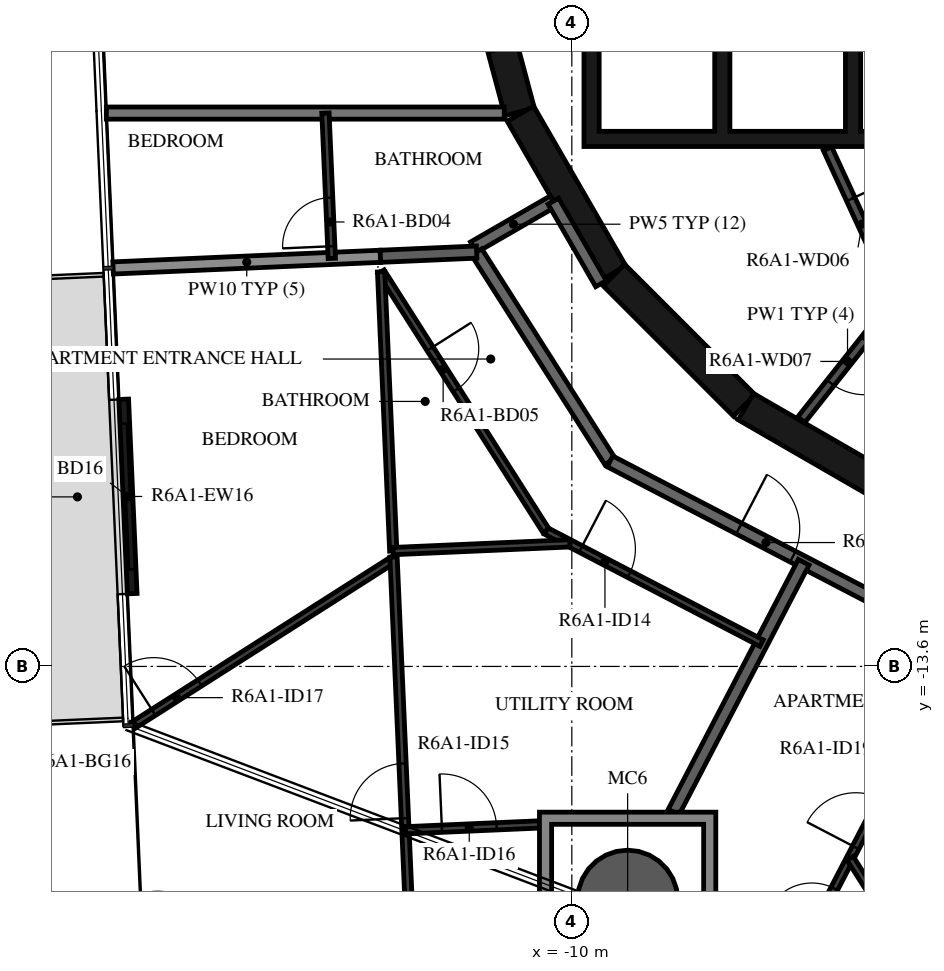
"""IFC4 building model, lengths in metres.
Left out: names, types, materials, properties, quantities, classifications, styles, units other than length and angle.
Written with IfcOpenShell. Run it as: python <this file> out.ifc"""

import sys

from ifc_helpers import new_model, si_unit, direction, frame, frame_2d, origin, origin_2d, place, context, subcontext, project, spatial, polyline, rectangle, hollow_circle, outline, extrude, element, fill, save


model = new_model("IFC4")
c1 = context("Model", 3, precision=1e-05, world=origin(), true_north=direction((0.0, 1.0)))
c2 = subcontext(c1, "Body", "Model", "MODEL_VIEW")
j1 = project(units=[si_unit("LENGTHUNIT", "METRE"), si_unit("PLANEANGLEUNIT", "RADIAN")], contexts=[c1])
p1 = place(None, origin())
s1 = spatial("IfcSite", under=j1, at=p1, CompositionType="ELEMENT")
p2 = place(p1, origin())
s2 = spatial("IfcBuilding", under=s1, at=p2, CompositionType="ELEMENT")
p3 = place(p2, frame((0.0, 0.0, 230.2)))
s3 = spatial("IfcBuildingStorey", under=s2, at=p3, CompositionType="ELEMENT", Elevation=230.2)
p4 = place(p3, frame((-9.082, -17.446, -0.38), z_axis=(0.0, 0.0, 1.0), x_axis=(1.0, 0.0, 0.0)))
e1 = element("IfcColumn", 1, at=p4, inside=s3, PredefinedType="COLUMN", context=c2, shape_type="SweptSolid", body=[
    extrude(hollow_circle(Radius=0.825, WallThickness=0.04, at=origin_2d()), origin(), (0.0, 0.0, 1.0), 3.5),
])
p5 = place(p3, frame((-17.369, -9.207, 0.0), z_axis=(0.0, 0.0, 1.0), x_axis=(0.043639181999, -0.999047357133, 0.0)))
e2 = element("IfcWall", 2, at=p5, inside=s3, PredefinedType="STANDARD", context=c2, shape_type="SweptSolid", body=[
    extrude(rectangle(XDim=3.2, YDim=0.16, at=frame_2d((1.6, 0.0))), origin(), (0.0, 0.0, 1.0), 3.12),
])
p6 = place(p5, frame((0.4, 0.0, 0.0)))
e3 = element("IfcOpeningElement", 3, at=p6, cuts=e2, PredefinedType="OPENING", context=c2, shape_type="SweptSolid", body=[
    extrude(rectangle(XDim=2.4, YDim=2.4, at=frame_2d((1.2, 1.2))), frame((0.0, 0.09, 0.0), z_axis=(0.0, -1.0, 0.0), x_axis=(1.0, 0.0, 0.0)), (0.0, 0.0, 1.0), 0.18),
])
p7 = place(p3, frame((-11.643, -1.55, 0.0), z_axis=(0.0, 0.0, 1.0), x_axis=(0.258734743916, -0.965948410781, 0.0)))
e4 = element("IfcWall", 4, at=p7, inside=s3, PredefinedType="SHEAR", context=c2, shape_type="SweptSolid", body=[
    extrude(rectangle(XDim=3.033, YDim=0.5, at=frame_2d((1.516, 0.0))), origin(), (0.0, 0.0, 1.0), 3.12),
])
p8 = place(p7, frame((1.066, 0.0, 0.0)))
e5 = element("IfcOpeningElement", 5, at=p8, cuts=e4, PredefinedType="OPENING", context=c2, shape_type="SweptSolid", body=[
    extrude(rectangle(XDim=0.9, YDim=2.1, at=frame_2d((0.45, 1.05))), frame((0.0, 0.26, 0.0), z_axis=(0.0, -1.0, 0.0), x_axis=(1.0, 0.0, 0.0)), (0.0, 0.0, 1.0), 0.52),
])
p9 = place(p3, frame((-10.845, -4.51, 0.0), z_axis=(0.0, 0.0, 1.0), x_axis=(0.500087131594, -0.865975092491, 0.0)))
e6 = element("IfcWall", 6, at=p9, inside=s3, PredefinedType="SHEAR", context=c2, shape_type="SweptSolid", body=[
    extrude(rectangle(XDim=3.033, YDim=0.5, at=frame_2d((1.516, 0.0))), origin(), (0.0, 0.0, 1.0), 3.12),
])
p10 = place(p3, frame((-9.308, -7.164, 0.0), z_axis=(0.0, 0.0, 1.0), x_axis=(0.707106781187, -0.707106781187, 0.0)))
e7 = element("IfcWall", 7, at=p10, inside=s3, PredefinedType="SHEAR", context=c2, shape_type="SweptSolid", body=[
    extrude(rectangle(XDim=3.032, YDim=0.5, at=frame_2d((1.516, 0.0))), origin(), (0.0, 0.0, 1.0), 3.12),
])
p11 = place(p3, frame((-7.137, -9.329, 0.0), z_axis=(0.0, 0.0, 1.0), x_axis=(0.865975092491, -0.500087131594, 0.0)))
e8 = element("IfcWall", 8, at=p11, inside=s3, PredefinedType="SHEAR", context=c2, shape_type="SweptSolid", body=[
    extrude(rectangle(XDim=3.033, YDim=0.5, at=frame_2d((1.516, 0.0))), origin(), (0.0, 0.0, 1.0), 3.12),
])
p12 = place(p3, origin())
e9 = element("IfcWall", 9, at=p12, inside=s3, PredefinedType="SHEAR", context=c2, shape_type="SweptSolid", body=[
    extrude(outline(polyline([(9.8, -5.05), (9.8, -4.8), (9.8, -1.9), (9.55, -1.9), (9.55, -4.8), (7.65, -4.8), (7.65, -1.9), (7.4, -1.9), (7.4, -4.8), (5.5, -4.8), (5.5, -1.9), (5.25, -1.9), (5.25, -4.8), (3.35, -4.8), (3.35, -1.9), (3.1, -1.9), (3.1, -4.8), (1.2, -4.8), (1.2, -1.9), (0.95, -1.9), (0.95, -4.8), (-0.95, -4.8), (-0.95, -1.9), (-1.2, -1.9), (-1.2, -4.8), (-5.25, -4.8), (-5.25, -1.9), (-5.5, -1.9), (-5.5, -4.8), (-7.4, -4.8), (-7.4, -1.9), (-7.65, -1.9), (-7.65, -4.8), (-9.55, -4.8), (-9.55, -1.9), (-9.8, -1.9), (-9.8, -4.8), (-9.8, -5.05), (9.8, -5.05)])), origin(), (0.0, 0.0, 1.0), 3.12),
])
p13 = place(p3, frame((-5.795, -5.086, 0.0), z_axis=(0.0, 0.0, 1.0), x_axis=(0.417887867606, -0.908498613157, 0.0)))
e10 = element("IfcWall", 10, at=p13, inside=s3, PredefinedType="PARTITIONING", context=c2, shape_type="SweptSolid", body=[
    extrude(rectangle(XDim=2.726, YDim=0.15, at=frame_2d((1.363, 0.0))), origin(), (0.0, 0.0, 1.0), 3.12),
])
p14 = place(p13, frame((0.913, 0.0, 0.0)))
e11 = element("IfcOpeningElement", 11, at=p14, cuts=e10, PredefinedType="OPENING", context=c2, shape_type="SweptSolid", body=[
    extrude(rectangle(XDim=0.9, YDim=2.1, at=frame_2d((0.45, 1.05))), frame((0.0, 0.085, 0.0), z_axis=(0.0, -1.0, 0.0), x_axis=(1.0, 0.0, 0.0)), (0.0, 0.0, 1.0), 0.17),
])
p15 = place(p3, frame((-4.706, -7.625, 0.0), z_axis=(0.0, 0.0, 1.0), x_axis=(-0.621392599334, -0.783499353856, 0.0)))
e12 = element("IfcWall", 12, at=p15, inside=s3, PredefinedType="PARTITIONING", context=c2, shape_type="SweptSolid", body=[
    extrude(rectangle(XDim=2.447, YDim=0.15, at=frame_2d((1.224, 0.0))), origin(), (0.0, 0.0, 1.0), 3.12),
])
p16 = place(p15, frame((0.774, 0.0, 0.0)))
e13 = element("IfcOpeningElement", 13, at=p16, cuts=e12, PredefinedType="OPENING", context=c2, shape_type="SweptSolid", body=[
    extrude(rectangle(XDim=0.9, YDim=2.1, at=frame_2d((0.45, 1.05))), frame((0.0, 0.085, 0.0), z_axis=(0.0, -1.0, 0.0), x_axis=(1.0, 0.0, 0.0)), (0.0, 0.0, 1.0), 0.17),
])
p17 = place(p3, frame((-10.303, -5.949, 0.0), z_axis=(0.0, 0.0, 1.0), x_axis=(-0.866043382451, -0.499968858743, 0.0)))
e14 = element("IfcWall", 14, at=p17, inside=s3, PredefinedType="STANDARD", context=c2, shape_type="SweptSolid", body=[
    extrude(rectangle(XDim=1.515, YDim=0.2, at=frame_2d((0.758, 0.0))), origin(), (0.0, 0.0, 1.0), 3.12),
])
p18 = place(p3, frame((-9.52, -7.305, 0.0), z_axis=(0.0, 0.0, 1.0), x_axis=(-0.500028278809, 0.866009076391, 0.0)))
e15 = element("IfcWall", 15, at=p18, inside=s3, PredefinedType="STANDARD", context=c2, shape_type="SweptSolid", body=[
    extrude(rectangle(XDim=1.566, YDim=0.2, at=frame_2d((0.783, 0.0))), origin(), (0.0, 0.0, 1.0), 3.12),
])
p19 = place(p3, frame((-11.565, -6.786, 0.0), z_axis=(0.0, 0.0, 1.0), x_axis=(0.537297327359, -0.843392898958, 0.0)))
e16 = element("IfcWall", 16, at=p19, inside=s3, PredefinedType="STANDARD", context=c2, shape_type="SweptSolid", body=[
    extrude(rectangle(XDim=4.081, YDim=0.2, at=frame_2d((2.041, 0.0))), origin(), (0.0, 0.0, 1.0), 3.12),
])
p20 = place(p3, frame((-9.372, -10.228, 0.0), z_axis=(0.0, 0.0, 1.0), x_axis=(0.887005184532, -0.461759464021, 0.0)))
e17 = element("IfcWall", 17, at=p20, inside=s3, PredefinedType="STANDARD", context=c2, shape_type="SweptSolid", body=[
    extrude(rectangle(XDim=7.181, YDim=0.2, at=frame_2d((3.591, 0.0))), origin(), (0.0, 0.0, 1.0), 3.12),
])
p21 = place(p20, frame((2.391, 0.0, 0.0)))
e18 = element("IfcOpeningElement", 18, at=p21, cuts=e17, PredefinedType="OPENING", context=c2, shape_type="SweptSolid", body=[
    extrude(rectangle(XDim=1.0, YDim=2.1, at=frame_2d((0.5, 1.05))), frame((0.0, 0.11, 0.0), z_axis=(0.0, -1.0, 0.0), x_axis=(1.0, 0.0, 0.0)), (0.0, 0.0, 1.0), 0.22),
])
p22 = place(p3, frame((-17.655, -4.5, 0.0), z_axis=(0.0, 0.0, 1.0), x_axis=(1.0, 0.0, 0.0)))
e19 = element("IfcWall", 19, at=p22, inside=s3, PredefinedType="STANDARD", context=c2, shape_type="SweptSolid", body=[
    extrude(rectangle(XDim=6.543, YDim=0.2, at=frame_2d((3.272, 0.0))), origin(), (0.0, 0.0, 1.0), 3.12),
])
p23 = place(p3, frame((-17.544, -7.047, 0.0), z_axis=(0.0, 0.0, 1.0), x_axis=(0.99904608111, 0.043668384662, 0.0)))
e20 = element("IfcWall", 20, at=p23, inside=s3, PredefinedType="STANDARD", context=c2, shape_type="SweptSolid", body=[
    extrude(rectangle(XDim=4.4, YDim=0.2, at=frame_2d((2.2, 0.0))), origin(), (0.0, 0.0, 1.0), 2.73),
])
p24 = place(p3, frame((-13.148, -6.855, 0.0), z_axis=(0.0, 0.0, 1.0), x_axis=(0.999048583464, 0.043611098121, 0.0)))
e21 = element("IfcWall", 21, at=p24, inside=s3, PredefinedType="STANDARD", context=c2, shape_type="SweptSolid", body=[
    extrude(rectangle(XDim=1.584, YDim=0.2, at=frame_2d((0.792, 0.0))), origin(), (0.0, 0.0, 1.0), 3.12),
])
p25 = place(p3, frame((-8.326, -15.996, 0.0), z_axis=(0.0, 0.0, 1.0), x_axis=(0.461739255077, 0.887015704664, 0.0)))
e22 = element("IfcWall", 22, at=p25, inside=s3, PredefinedType="STANDARD", context=c2, shape_type="SweptSolid", body=[
    extrude(rectangle(XDim=4.633, YDim=0.2, at=frame_2d((2.317, 0.0))), origin(), (0.0, 0.0, 1.0), 3.12),
])
p26 = place(p3, frame((-13.947, -6.89, 0.0), z_axis=(0.0, 0.0, 1.0), x_axis=(-0.043680814195, 0.999045537737, 0.0)))
e23 = element("IfcWall", 23, at=p26, inside=s3, PredefinedType="PARTITIONING", context=c2, shape_type="SweptSolid", body=[
    extrude(rectangle(XDim=2.392, YDim=0.12, at=frame_2d((1.196, 0.0))), origin(), (0.0, 0.0, 1.0), 3.12),
])
p27 = place(p26, frame((0.2, 0.0, 0.0)))
e24 = element("IfcOpeningElement", 24, at=p27, cuts=e23, PredefinedType="OPENING", context=c2, shape_type="SweptSolid", body=[
    extrude(rectangle(XDim=0.8, YDim=2.1, at=frame_2d((0.4, 1.05))), frame((0.0, 0.07, 0.0), z_axis=(0.0, -1.0, 0.0), x_axis=(1.0, 0.0, 0.0)), (0.0, 0.0, 1.0), 0.14),
])
p28 = place(p3, frame((-13.137, -7.111, 0.0), z_axis=(0.0, 0.0, 1.0), x_axis=(0.537300549444, -0.843390846267, 0.0)))
e25 = element("IfcWall", 25, at=p28, inside=s3, PredefinedType="PARTITIONING", context=c2, shape_type="SweptSolid", body=[
    extrude(rectangle(XDim=5.054, YDim=0.12, at=frame_2d((2.527, 0.0))), origin(), (0.0, 0.0, 1.0), 3.12),
])
p29 = place(p28, frame((1.5, 0.0, 0.0)))
e26 = element("IfcOpeningElement", 26, at=p29, cuts=e25, PredefinedType="OPENING", context=c2, shape_type="SweptSolid", body=[
    extrude(rectangle(XDim=0.8, YDim=2.1, at=frame_2d((0.4, 1.05))), frame((0.0, 0.07, 0.0), z_axis=(0.0, -1.0, 0.0), x_axis=(1.0, 0.0, 0.0)), (0.0, 0.0, 1.0), 0.14),
])
p30 = place(p3, frame((-10.421, -11.373, 0.0), z_axis=(0.0, 0.0, 1.0), x_axis=(0.887006451745, -0.461757029792, 0.0)))
e27 = element("IfcWall", 27, at=p30, inside=s3, PredefinedType="PARTITIONING", context=c2, shape_type="SweptSolid", body=[
    extrude(rectangle(XDim=3.992, YDim=0.12, at=frame_2d((1.996, 0.0))), origin(), (0.0, 0.0, 1.0), 3.12),
])
p31 = place(p30, frame((0.639, 0.0, 0.0)))
e28 = element("IfcOpeningElement", 28, at=p31, cuts=e27, PredefinedType="OPENING", context=c2, shape_type="SweptSolid", body=[
    extrude(rectangle(XDim=0.9, YDim=2.1, at=frame_2d((0.45, 1.05))), frame((0.0, 0.07, 0.0), z_axis=(0.0, -1.0, 0.0), x_axis=(1.0, 0.0, 0.0)), (0.0, 0.0, 1.0), 0.14),
])
p32 = place(p3, frame((-12.936, -11.703, 0.0), z_axis=(0.0, 0.0, 1.0), x_axis=(-0.043610108597, 0.999048626658, 0.0)))
e29 = element("IfcWall", 29, at=p32, inside=s3, PredefinedType="PARTITIONING", context=c2, shape_type="SweptSolid", body=[
    extrude(rectangle(XDim=4.596, YDim=0.12, at=frame_2d((2.298, 0.0))), origin(), (0.0, 0.0, 1.0), 3.12),
])
p33 = place(p3, frame((-17.215, -14.57, 0.0), z_axis=(0.0, 0.0, 1.0), x_axis=(0.843396239681, 0.537292083407, 0.0)))
e30 = element("IfcWall", 30, at=p33, inside=s3, PredefinedType="PARTITIONING", context=c2, shape_type="SweptSolid", body=[
    extrude(rectangle(XDim=5.081, YDim=0.12, at=frame_2d((2.54, 0.0))), origin(), (0.0, 0.0, 1.0), 3.12),
])
p34 = place(p33, frame((0.4, 0.0, 0.0)))
e31 = element("IfcOpeningElement", 31, at=p34, cuts=e30, PredefinedType="OPENING", context=c2, shape_type="SweptSolid", body=[
    extrude(rectangle(XDim=0.9, YDim=2.1, at=frame_2d((0.45, 1.05))), frame((0.0, 0.07, 0.0), z_axis=(0.0, -1.0, 0.0), x_axis=(1.0, 0.0, 0.0)), (0.0, 0.0, 1.0), 0.14),
])
p35 = place(p3, frame((-12.936, -11.703, 0.0), z_axis=(0.0, 0.0, 1.0), x_axis=(0.999046310188, 0.043663143495, 0.0)))
e32 = element("IfcWall", 32, at=p35, inside=s3, PredefinedType="PARTITIONING", context=c2, shape_type="SweptSolid", body=[
    extrude(rectangle(XDim=2.907, YDim=0.12, at=frame_2d((1.454, 0.0))), origin(), (0.0, 0.0, 1.0), 3.12),
])
p36 = place(p3, frame((-12.69, -17.347, 0.0), z_axis=(0.0, 0.0, 1.0), x_axis=(-0.043618497177, 0.999048260448, 0.0)))
e33 = element("IfcWall", 33, at=p36, inside=s3, PredefinedType="PARTITIONING", context=c2, shape_type="SweptSolid", body=[
    extrude(rectangle(XDim=5.552, YDim=0.12, at=frame_2d((2.776, 0.0))), origin(), (0.0, 0.0, 1.0), 3.12),
])
p37 = place(p36, frame((1.254, 0.0, 0.0)))
e34 = element("IfcOpeningElement", 34, at=p37, cuts=e33, PredefinedType="OPENING", context=c2, shape_type="SweptSolid", body=[
    extrude(rectangle(XDim=0.9, YDim=2.1, at=frame_2d((0.45, 1.05))), frame((0.0, 0.07, 0.0), z_axis=(0.0, -1.0, 0.0), x_axis=(1.0, 0.0, 0.0)), (0.0, 0.0, 1.0), 0.14),
])
p38 = place(p3, frame((-12.736, -16.295, 0.0), z_axis=(0.0, 0.0, 1.0), x_axis=(0.999043796611, 0.043720618177, 0.0)))
e35 = element("IfcWall", 35, at=p38, inside=s3, PredefinedType="PARTITIONING", context=c2, shape_type="SweptSolid", body=[
    extrude(rectangle(XDim=2.206, YDim=0.12, at=frame_2d((1.103, 0.0))), origin(), (0.0, 0.0, 1.0), 3.12),
])
p39 = place(p38, frame((0.6, 0.0, 0.0)))
e36 = element("IfcOpeningElement", 36, at=p39, cuts=e35, PredefinedType="OPENING", context=c2, shape_type="SweptSolid", body=[
    extrude(rectangle(XDim=0.9, YDim=2.1, at=frame_2d((0.45, 1.05))), frame((0.0, 0.07, 0.0), z_axis=(0.0, -1.0, 0.0), x_axis=(1.0, 0.0, 0.0)), (0.0, 0.0, 1.0), 0.14),
])
p40 = place(p3, frame((-6.329, -18.494, 0.0), z_axis=(0.0, 0.0, 1.0), x_axis=(0.461759058182, 0.887005395805, 0.0)))
e37 = element("IfcWall", 37, at=p40, inside=s3, PredefinedType="PARTITIONING", context=c2, shape_type="SweptSolid", body=[
    extrude(rectangle(XDim=4.427, YDim=0.12, at=frame_2d((2.213, 0.0))), origin(), (0.0, 0.0, 1.0), 3.12),
])
p41 = place(p40, frame((0.6, 0.0, 0.0)))
e38 = element("IfcOpeningElement", 38, at=p41, cuts=e37, PredefinedType="OPENING", context=c2, shape_type="SweptSolid", body=[
    extrude(rectangle(XDim=0.8, YDim=2.1, at=frame_2d((0.4, 1.05))), frame((0.0, 0.07, 0.0), z_axis=(0.0, -1.0, 0.0), x_axis=(1.0, 0.0, 0.0)), (0.0, 0.0, 1.0), 0.14),
])
p42 = place(p40, frame((2.161, 0.0, 0.0)))
e39 = element("IfcOpeningElement", 39, at=p42, cuts=e37, PredefinedType="OPENING", context=c2, shape_type="SweptSolid", body=[
    extrude(rectangle(XDim=0.9, YDim=2.1, at=frame_2d((0.45, 1.05))), frame((0.0, 0.07, 0.0), z_axis=(0.0, -1.0, 0.0), x_axis=(1.0, 0.0, 0.0)), (0.0, 0.0, 1.0), 0.14),
])
p43 = place(p3, frame((-4.662, -17.95, 0.0), z_axis=(0.0, 0.0, 1.0), x_axis=(-0.537254271207, 0.843420327043, 0.0)))
e40 = element("IfcWall", 40, at=p43, inside=s3, PredefinedType="PARTITIONING", context=c2, shape_type="SweptSolid", body=[
    extrude(rectangle(XDim=1.418, YDim=0.12, at=frame_2d((0.709, 0.0))), origin(), (0.0, 0.0, 1.0), 3.12),
])
p44 = place(p3, frame((-7.322, -19.645, 0.0), z_axis=(0.0, 0.0, 1.0), x_axis=(0.843385361817, 0.537309158188, 0.0)))
e41 = element("IfcWall", 41, at=p44, inside=s3, PredefinedType="PARTITIONING", context=c2, shape_type="SweptSolid", body=[
    extrude(rectangle(XDim=8.814, YDim=0.12, at=frame_2d((4.407, 0.0))), origin(), (0.0, 0.0, 1.0), 3.12),
])
p45 = place(p44, frame((3.314, 0.0, 0.0)))
e42 = element("IfcOpeningElement", 42, at=p45, cuts=e41, PredefinedType="OPENING", context=c2, shape_type="SweptSolid", body=[
    extrude(rectangle(XDim=0.9, YDim=2.1, at=frame_2d((0.45, 1.05))), frame((0.0, 0.07, 0.0), z_axis=(0.0, -1.0, 0.0), x_axis=(1.0, 0.0, 0.0)), (0.0, 0.0, 1.0), 0.14),
])
p46 = place(p3, origin())
e43 = element("IfcWall", 43, at=p46, inside=s3, PredefinedType="STANDARD", context=c2, shape_type="SweptSolid", body=[
    extrude(outline(polyline([(-7.632, -15.996), (-7.632, -18.896), (-10.532, -18.896), (-10.532, -15.996), (-7.632, -15.996)]), holes=[polyline([(-10.332, -18.696), (-7.832, -18.696), (-7.832, -16.196), (-10.332, -16.196), (-10.332, -18.696)])]), origin(), (0.0, 0.0, 1.0), 3.12),
])
p47 = place(p6, origin())
e44 = element("IfcDoor", 44, at=p47, inside=s3, OperationType="DOUBLE_DOOR_SLIDING", PredefinedType="DOOR", context=c2, shape_type="SweptSolid", body=[
    extrude(rectangle(XDim=2.4, YDim=2.4, at=frame_2d((1.2, 1.2))), frame((0.0, 0.025, 0.0), z_axis=(0.0, -1.0, 0.0), x_axis=(1.0, 0.0, 0.0)), (0.0, 0.0, 1.0), 0.05),
])
fill(e3, e44)
p48 = place(p14, origin())
e45 = element("IfcDoor", 45, at=p48, inside=s3, OperationType="SINGLE_SWING_RIGHT", PredefinedType="DOOR", context=c2, shape_type="SweptSolid", body=[
    extrude(rectangle(XDim=0.9, YDim=2.1, at=frame_2d((0.45, 1.05))), frame((0.0, 0.025, 0.0), z_axis=(0.0, -1.0, 0.0), x_axis=(1.0, 0.0, 0.0)), (0.0, 0.0, 1.0), 0.05),
])
fill(e11, e45)
p49 = place(p16, origin())
e46 = element("IfcDoor", 46, at=p49, inside=s3, OperationType="SINGLE_SWING_LEFT", PredefinedType="DOOR", context=c2, shape_type="SweptSolid", body=[
    extrude(rectangle(XDim=0.9, YDim=2.1, at=frame_2d((0.45, 1.05))), frame((0.0, 0.025, 0.0), z_axis=(0.0, -1.0, 0.0), x_axis=(1.0, 0.0, 0.0)), (0.0, 0.0, 1.0), 0.05),
])
fill(e13, e46)
p50 = place(p27, origin())
e47 = element("IfcDoor", 47, at=p50, inside=s3, OperationType="SINGLE_SWING_LEFT", PredefinedType="DOOR", context=c2, shape_type="SweptSolid", body=[
    extrude(rectangle(XDim=0.8, YDim=2.1, at=frame_2d((0.4, 1.05))), frame((0.0, 0.025, 0.0), z_axis=(0.0, -1.0, 0.0), x_axis=(1.0, 0.0, 0.0)), (0.0, 0.0, 1.0), 0.05),
])
fill(e24, e47)
p51 = place(p21, origin())
e48 = element("IfcDoor", 48, at=p51, inside=s3, OperationType="SINGLE_SWING_RIGHT", PredefinedType="DOOR", context=c2, shape_type="SweptSolid", body=[
    extrude(rectangle(XDim=1.0, YDim=2.1, at=frame_2d((0.5, 1.05))), frame((0.0, 0.025, 0.0), z_axis=(0.0, -1.0, 0.0), x_axis=(1.0, 0.0, 0.0)), (0.0, 0.0, 1.0), 0.05),
])
fill(e18, e48)
p52 = place(p29, origin())
e49 = element("IfcDoor", 49, at=p52, inside=s3, OperationType="SINGLE_SWING_RIGHT", PredefinedType="DOOR", context=c2, shape_type="SweptSolid", body=[
    extrude(rectangle(XDim=0.8, YDim=2.1, at=frame_2d((0.4, 1.05))), frame((0.0, 0.025, 0.0), z_axis=(0.0, -1.0, 0.0), x_axis=(1.0, 0.0, 0.0)), (0.0, 0.0, 1.0), 0.05),
])
fill(e26, e49)
p53 = place(p31, origin())
e50 = element("IfcDoor", 50, at=p53, inside=s3, OperationType="SINGLE_SWING_RIGHT", PredefinedType="DOOR", context=c2, shape_type="SweptSolid", body=[
    extrude(rectangle(XDim=0.9, YDim=2.1, at=frame_2d((0.45, 1.05))), frame((0.0, 0.025, 0.0), z_axis=(0.0, -1.0, 0.0), x_axis=(1.0, 0.0, 0.0)), (0.0, 0.0, 1.0), 0.05),
])
fill(e28, e50)
p54 = place(p37, origin())
e51 = element("IfcDoor", 51, at=p54, inside=s3, OperationType="SINGLE_SWING_RIGHT", PredefinedType="DOOR", context=c2, shape_type="SweptSolid", body=[
    extrude(rectangle(XDim=0.9, YDim=2.1, at=frame_2d((0.45, 1.05))), frame((0.0, 0.025, 0.0), z_axis=(0.0, -1.0, 0.0), x_axis=(1.0, 0.0, 0.0)), (0.0, 0.0, 1.0), 0.05),
])
fill(e34, e51)
p55 = place(p39, origin())
e52 = element("IfcDoor", 52, at=p55, inside=s3, OperationType="SINGLE_SWING_RIGHT", PredefinedType="DOOR", context=c2, shape_type="SweptSolid", body=[
    extrude(rectangle(XDim=0.9, YDim=2.1, at=frame_2d((0.45, 1.05))), frame((0.0, 0.025, 0.0), z_axis=(0.0, -1.0, 0.0), x_axis=(1.0, 0.0, 0.0)), (0.0, 0.0, 1.0), 0.05),
])
fill(e36, e52)
p56 = place(p34, origin())
e53 = element("IfcDoor", 53, at=p56, inside=s3, OperationType="SINGLE_SWING_LEFT", PredefinedType="DOOR", context=c2, shape_type="SweptSolid", body=[
    extrude(rectangle(XDim=0.9, YDim=2.1, at=frame_2d((0.45, 1.05))), frame((0.0, 0.025, 0.0), z_axis=(0.0, -1.0, 0.0), x_axis=(1.0, 0.0, 0.0)), (0.0, 0.0, 1.0), 0.05),
])
fill(e31, e53)
p57 = place(p41, origin())
e54 = element("IfcDoor", 54, at=p57, inside=s3, OperationType="SINGLE_SWING_LEFT", PredefinedType="DOOR", context=c2, shape_type="SweptSolid", body=[
    extrude(rectangle(XDim=0.8, YDim=2.1, at=frame_2d((0.4, 1.05))), frame((0.0, 0.025, 0.0), z_axis=(0.0, -1.0, 0.0), x_axis=(1.0, 0.0, 0.0)), (0.0, 0.0, 1.0), 0.05),
])
fill(e38, e54)
p58 = place(p42, origin())
e55 = element("IfcDoor", 55, at=p58, inside=s3, OperationType="SINGLE_SWING_LEFT", PredefinedType="DOOR", context=c2, shape_type="SweptSolid", body=[
    extrude(rectangle(XDim=0.9, YDim=2.1, at=frame_2d((0.45, 1.05))), frame((0.0, 0.025, 0.0), z_axis=(0.0, -1.0, 0.0), x_axis=(1.0, 0.0, 0.0)), (0.0, 0.0, 1.0), 0.05),
])
fill(e39, e55)
save(model, sys.argv[1])
